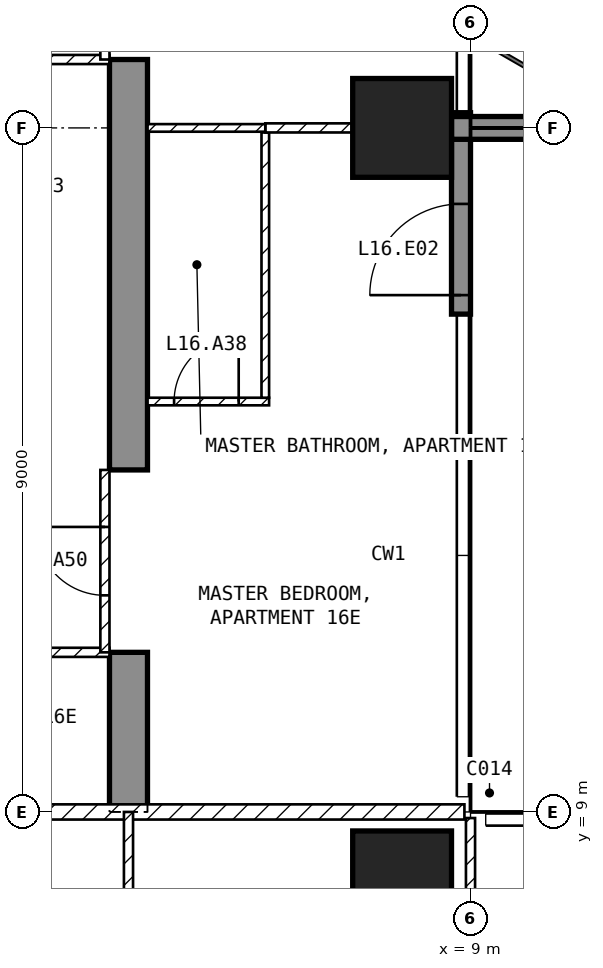
"""IFC4 building model, lengths in metres.
Left out: names, types, materials, properties, quantities, classifications, styles, units other than length and angle.
Written with IfcOpenShell. Run it as: python <this file> out.ifc"""

import sys

from ifc_helpers import new_model, si_unit, direction, frame, frame_2d, origin, origin_2d, place, context, subcontext, project, spatial, polyline, rectangle, outline, extrude, element, fill, save


model = new_model("IFC4")
c1 = context("Model", 3, precision=1e-05, world=origin(), true_north=direction((0.0, 1.0)))
c2 = subcontext(c1, "Body", "Model", "MODEL_VIEW")
j1 = project(units=[si_unit("LENGTHUNIT", "METRE"), si_unit("PLANEANGLEUNIT", "RADIAN")], contexts=[c1])
p1 = place(None, origin())
s1 = spatial("IfcSite", under=j1, at=p1, CompositionType="ELEMENT")
p2 = place(p1, origin())
s2 = spatial("IfcBuilding", under=s1, at=p2, CompositionType="ELEMENT")
p3 = place(p2, frame((0.0, 0.0, 75.0)))
s3 = spatial("IfcBuildingStorey", under=s2, at=p3, CompositionType="ELEMENT", Elevation=75.0)
for number, where, z_axis, x_axis in (
    (1, (8.1, 8.1, -0.25), (0.0, 0.0, 1.0), (1.0, 0.0, 0.0)),
    (2, (8.1, 18.0, -0.25), (0.0, 0.0, 1.0), (1.0, 0.0, 0.0)),
):
    element("IfcColumn", number, at=place(p3, frame(where, z_axis=z_axis, x_axis=x_axis)), inside=s3, PredefinedType="COLUMN", context=c2, shape_type="SweptSolid", body=[
        extrude(rectangle(XDim=1.3, YDim=1.3, at=origin_2d()), origin(), (0.0, 0.0, 1.0), 3.5),
    ])
p4 = place(p3, frame((4.25, 9.0, -0.25), z_axis=(1.0, 0.0, 0.0), x_axis=(0.0, 1.0, 0.0)))
e3 = element("IfcWall", 3, at=p4, inside=s3, PredefinedType="SHEAR", context=c2, shape_type="SweptSolid", body=[
    extrude(outline(polyline([(0.0, 0.0), (2.1, 0.0), (2.1, 2.65), (4.5, 2.65), (4.5, 0.0), (9.9, 0.0), (9.9, 2.65), (12.3, 2.65), (12.3, 0.0), (16.45, 0.0), (16.45, 3.5), (0.0, 3.5), (0.0, 0.0)])), origin(), (0.0, 0.0, 1.0), 0.5),
])
p5 = place(p3, frame((8.875, 15.55, 0.0), z_axis=(0.0, 0.0, 1.0), x_axis=(0.0, 1.0, 0.0)))
e4 = element("IfcWall", 4, at=p5, inside=s3, PredefinedType="SOLIDWALL", context=c2, shape_type="SweptSolid", body=[
    extrude(rectangle(XDim=2.65, YDim=0.25, at=frame_2d((1.325, 0.0))), origin(), (0.0, 0.0, 1.0), 3.25),
])
p6 = place(p5, frame((0.25, 0.0, 0.0)))
e5 = element("IfcOpeningElement", 5, at=p6, cuts=e4, PredefinedType="OPENING", context=c2, shape_type="SweptSolid", body=[
    extrude(rectangle(XDim=1.2, YDim=2.4, at=frame_2d((0.6, 1.2))), frame((0.0, 0.135, 0.0), z_axis=(0.0, -1.0, 0.0), x_axis=(1.0, 0.0, 0.0)), (0.0, 0.0, 1.0), 0.27),
])
p7 = place(p3, frame((8.75, 18.0, 0.0), z_axis=(0.0, 0.0, 1.0), x_axis=(1.0, 0.0, 0.0)))
e6 = element("IfcWall", 6, at=p7, inside=s3, PredefinedType="SOLIDWALL", context=c2, shape_type="SweptSolid", body=[
    extrude(rectangle(XDim=2.95, YDim=0.3, at=frame_2d((1.475, 0.0))), origin(), (0.0, 0.0, 1.0), 3.25),
])
p8 = place(p3, frame((-8.92, 9.0, 0.0), z_axis=(0.0, 0.0, 1.0), x_axis=(1.0, 0.0, 0.0)))
e7 = element("IfcWall", 7, at=p8, inside=s3, PredefinedType="PARTITIONING", context=c2, shape_type="SweptSolid", body=[
    extrude(rectangle(XDim=17.84, YDim=0.2, at=frame_2d((8.92, 0.0))), origin(), (0.0, 0.0, 1.0), 3.25),
])
p9 = place(p8, frame((8.42, 0.0, 0.0)))
e8 = element("IfcOpeningElement", 8, at=p9, cuts=e7, PredefinedType="OPENING", context=c2, shape_type="SweptSolid", body=[
    extrude(rectangle(XDim=1.0, YDim=2.1, at=frame_2d((0.5, 1.05))), frame((0.0, 0.11, 0.0), z_axis=(0.0, -1.0, 0.0), x_axis=(1.0, 0.0, 0.0)), (0.0, 0.0, 1.0), 0.22),
])
p10 = place(p3, frame((9.0, 3.6, 0.0), z_axis=(0.0, 0.0, 1.0), x_axis=(0.0, 1.0, 0.0)))
e9 = element("IfcWall", 9, at=p10, inside=s3, PredefinedType="PARTITIONING", context=c2, shape_type="SweptSolid", body=[
    extrude(rectangle(XDim=5.32, YDim=0.12, at=frame_2d((2.66, 0.0))), origin(), (0.0, 0.0, 1.0), 3.25),
])
p11 = place(p10, frame((1.75, 0.0, 0.0)))
e10 = element("IfcOpeningElement", 10, at=p11, cuts=e9, PredefinedType="OPENING", context=c2, shape_type="SweptSolid", body=[
    extrude(rectangle(XDim=0.9, YDim=2.1, at=frame_2d((0.45, 1.05))), frame((0.0, 0.07, 0.0), z_axis=(0.0, -1.0, 0.0), x_axis=(1.0, 0.0, 0.0)), (0.0, 0.0, 1.0), 0.14),
])
p12 = place(p3, frame((4.5, 4.32, 0.0), z_axis=(0.0, 0.0, 1.0), x_axis=(0.0, 1.0, 0.0)))
e11 = element("IfcWall", 11, at=p12, inside=s3, PredefinedType="PARTITIONING", context=c2, shape_type="SweptSolid", body=[
    extrude(rectangle(XDim=4.68, YDim=0.12, at=frame_2d((2.34, 0.0))), origin(), (0.0, 0.0, 1.0), 3.25),
])
p13 = place(p12, frame((1.89, 0.0, 0.0)))
e12 = element("IfcOpeningElement", 12, at=p13, cuts=e11, PredefinedType="OPENING", context=c2, shape_type="SweptSolid", body=[
    extrude(rectangle(XDim=0.9, YDim=2.1, at=frame_2d((0.45, 1.05))), frame((0.0, 0.07, 0.0), z_axis=(0.0, -1.0, 0.0), x_axis=(1.0, 0.0, 0.0)), (0.0, 0.0, 1.0), 0.14),
])
p14 = place(p3, frame((-2.1, 11.1, 0.0), z_axis=(0.0, 0.0, 1.0), x_axis=(1.0, 0.0, 0.0)))
e13 = element("IfcWall", 13, at=p14, inside=s3, PredefinedType="PARTITIONING", context=c2, shape_type="SweptSolid", body=[
    extrude(rectangle(XDim=6.35, YDim=0.12, at=frame_2d((3.175, 0.0))), origin(), (0.0, 0.0, 1.0), 3.25),
])
p15 = place(p14, frame((2.725, 0.0, 0.0)))
e14 = element("IfcOpeningElement", 14, at=p15, cuts=e13, PredefinedType="OPENING", context=c2, shape_type="SweptSolid", body=[
    extrude(rectangle(XDim=0.9, YDim=2.1, at=frame_2d((0.45, 1.05))), frame((0.0, 0.07, 0.0), z_axis=(0.0, -1.0, 0.0), x_axis=(1.0, 0.0, 0.0)), (0.0, 0.0, 1.0), 0.14),
])
p16 = place(p3, frame((-4.25, 18.9, 0.0), z_axis=(0.0, 0.0, 1.0), x_axis=(1.0, 0.0, 0.0)))
e15 = element("IfcWall", 15, at=p16, inside=s3, PredefinedType="PARTITIONING", context=c2, shape_type="SweptSolid", body=[
    extrude(rectangle(XDim=8.5, YDim=0.12, at=frame_2d((4.25, 0.0))), origin(), (0.0, 0.0, 1.0), 3.25),
])
p17 = place(p16, frame((1.925, 0.0, 0.0)))
e16 = element("IfcOpeningElement", 16, at=p17, cuts=e15, PredefinedType="OPENING", context=c2, shape_type="SweptSolid", body=[
    extrude(rectangle(XDim=0.9, YDim=2.1, at=frame_2d((0.45, 1.05))), frame((0.0, 0.07, 0.0), z_axis=(0.0, -1.0, 0.0), x_axis=(1.0, 0.0, 0.0)), (0.0, 0.0, 1.0), 0.14),
])
p18 = place(p3, frame((4.75, 14.4, 0.0), z_axis=(0.0, 0.0, 1.0), x_axis=(1.0, 0.0, 0.0)))
e17 = element("IfcWall", 17, at=p18, inside=s3, PredefinedType="PARTITIONING", context=c2, shape_type="SweptSolid", body=[
    extrude(rectangle(XDim=1.6, YDim=0.1, at=frame_2d((0.8, 0.0))), origin(), (0.0, 0.0, 1.0), 3.25),
])
p19 = place(p18, frame((0.35, 0.0, 0.0)))
e18 = element("IfcOpeningElement", 18, at=p19, cuts=e17, PredefinedType="OPENING", context=c2, shape_type="SweptSolid", body=[
    extrude(rectangle(XDim=0.85, YDim=2.1, at=frame_2d((0.425, 1.05))), frame((0.0, 0.06, 0.0), z_axis=(0.0, -1.0, 0.0), x_axis=(1.0, 0.0, 0.0)), (0.0, 0.0, 1.0), 0.12),
])
p20 = place(p3, frame((6.3, 14.45, 0.0), z_axis=(0.0, 0.0, 1.0), x_axis=(0.0, 1.0, 0.0)))
e19 = element("IfcWall", 19, at=p20, inside=s3, PredefinedType="PARTITIONING", context=c2, shape_type="SweptSolid", body=[
    extrude(rectangle(XDim=3.49, YDim=0.1, at=frame_2d((1.745, 0.0))), origin(), (0.0, 0.0, 1.0), 3.25),
])
p21 = place(p3, frame((6.3, 18.0, 0.0), z_axis=(0.0, 0.0, 1.0), x_axis=(1.0, 0.0, 0.0)))
e20 = element("IfcWall", 20, at=p21, inside=s3, PredefinedType="PARTITIONING", context=c2, shape_type="SweptSolid", body=[
    extrude(rectangle(XDim=1.15, YDim=0.12, at=frame_2d((0.575, 0.0))), origin(), (0.0, 0.0, 1.0), 2.346),
])
p22 = place(p3, frame((4.75, 18.0, 0.0), z_axis=(0.0, 0.0, 1.0), x_axis=(1.0, 0.0, 0.0)))
e21 = element("IfcWall", 21, at=p22, inside=s3, PredefinedType="PARTITIONING", context=c2, shape_type="SweptSolid", body=[
    extrude(rectangle(XDim=1.55, YDim=0.1, at=frame_2d((0.775, 0.0))), origin(), (0.0, 0.0, 1.0), 2.346),
])
p23 = place(p3, frame((4.19, 11.1, 0.0), z_axis=(0.0, 0.0, 1.0), x_axis=(0.0, 1.0, 0.0)))
e22 = element("IfcWall", 22, at=p23, inside=s3, PredefinedType="PARTITIONING", context=c2, shape_type="SweptSolid", body=[
    extrude(rectangle(XDim=2.4, YDim=0.12, at=frame_2d((1.2, 0.0))), origin(), (0.0, 0.0, 1.0), 2.4),
])
p24 = place(p23, frame((0.75, 0.0, 0.0)))
e23 = element("IfcOpeningElement", 23, at=p24, cuts=e22, PredefinedType="OPENING", context=c2, shape_type="SweptSolid", body=[
    extrude(rectangle(XDim=0.9, YDim=2.1, at=frame_2d((0.45, 1.05))), frame((0.0, 0.07, 0.0), z_axis=(0.0, -1.0, 0.0), x_axis=(1.0, 0.0, 0.0)), (0.0, 0.0, 1.0), 0.14),
])
p25 = place(p3, frame((4.19, 18.9, 0.0), z_axis=(0.0, 0.0, 1.0), x_axis=(0.0, 1.0, 0.0)))
e24 = element("IfcWall", 24, at=p25, inside=s3, PredefinedType="PARTITIONING", context=c2, shape_type="SweptSolid", body=[
    extrude(rectangle(XDim=2.4, YDim=0.12, at=frame_2d((1.2, 0.0))), origin(), (0.0, 0.0, 1.0), 2.4),
])
p26 = place(p25, frame((0.75, 0.0, 0.0)))
e25 = element("IfcOpeningElement", 25, at=p26, cuts=e24, PredefinedType="OPENING", context=c2, shape_type="SweptSolid", body=[
    extrude(rectangle(XDim=0.9, YDim=2.1, at=frame_2d((0.45, 1.05))), frame((0.0, 0.07, 0.0), z_axis=(0.0, -1.0, 0.0), x_axis=(1.0, 0.0, 0.0)), (0.0, 0.0, 1.0), 0.14),
])
p27 = place(p6, origin())
e26 = element("IfcDoor", 26, at=p27, inside=s3, OperationType="SINGLE_SWING_LEFT", PredefinedType="DOOR", context=c2, shape_type="SweptSolid", body=[
    extrude(rectangle(XDim=1.2, YDim=2.4, at=frame_2d((0.6, 1.2))), frame((0.0, 0.025, 0.0), z_axis=(0.0, -1.0, 0.0), x_axis=(1.0, 0.0, 0.0)), (0.0, 0.0, 1.0), 0.05),
])
fill(e5, e26)
p28 = place(p19, origin())
e27 = element("IfcDoor", 27, at=p28, inside=s3, OperationType="SINGLE_SWING_RIGHT", PredefinedType="DOOR", context=c2, shape_type="SweptSolid", body=[
    extrude(rectangle(XDim=0.85, YDim=2.1, at=frame_2d((0.425, 1.05))), frame((0.0, 0.025, 0.0), z_axis=(0.0, -1.0, 0.0), x_axis=(1.0, 0.0, 0.0)), (0.0, 0.0, 1.0), 0.05),
])
fill(e18, e27)
p29 = place(p24, origin())
e28 = element("IfcDoor", 28, at=p29, inside=s3, OperationType="SINGLE_SWING_RIGHT", PredefinedType="DOOR", context=c2, shape_type="SweptSolid", body=[
    extrude(rectangle(XDim=0.9, YDim=2.1, at=frame_2d((0.45, 1.05))), frame((0.0, 0.025, 0.0), z_axis=(0.0, -1.0, 0.0), x_axis=(1.0, 0.0, 0.0)), (0.0, 0.0, 1.0), 0.05),
])
fill(e23, e28)
save(model, sys.argv[1])
